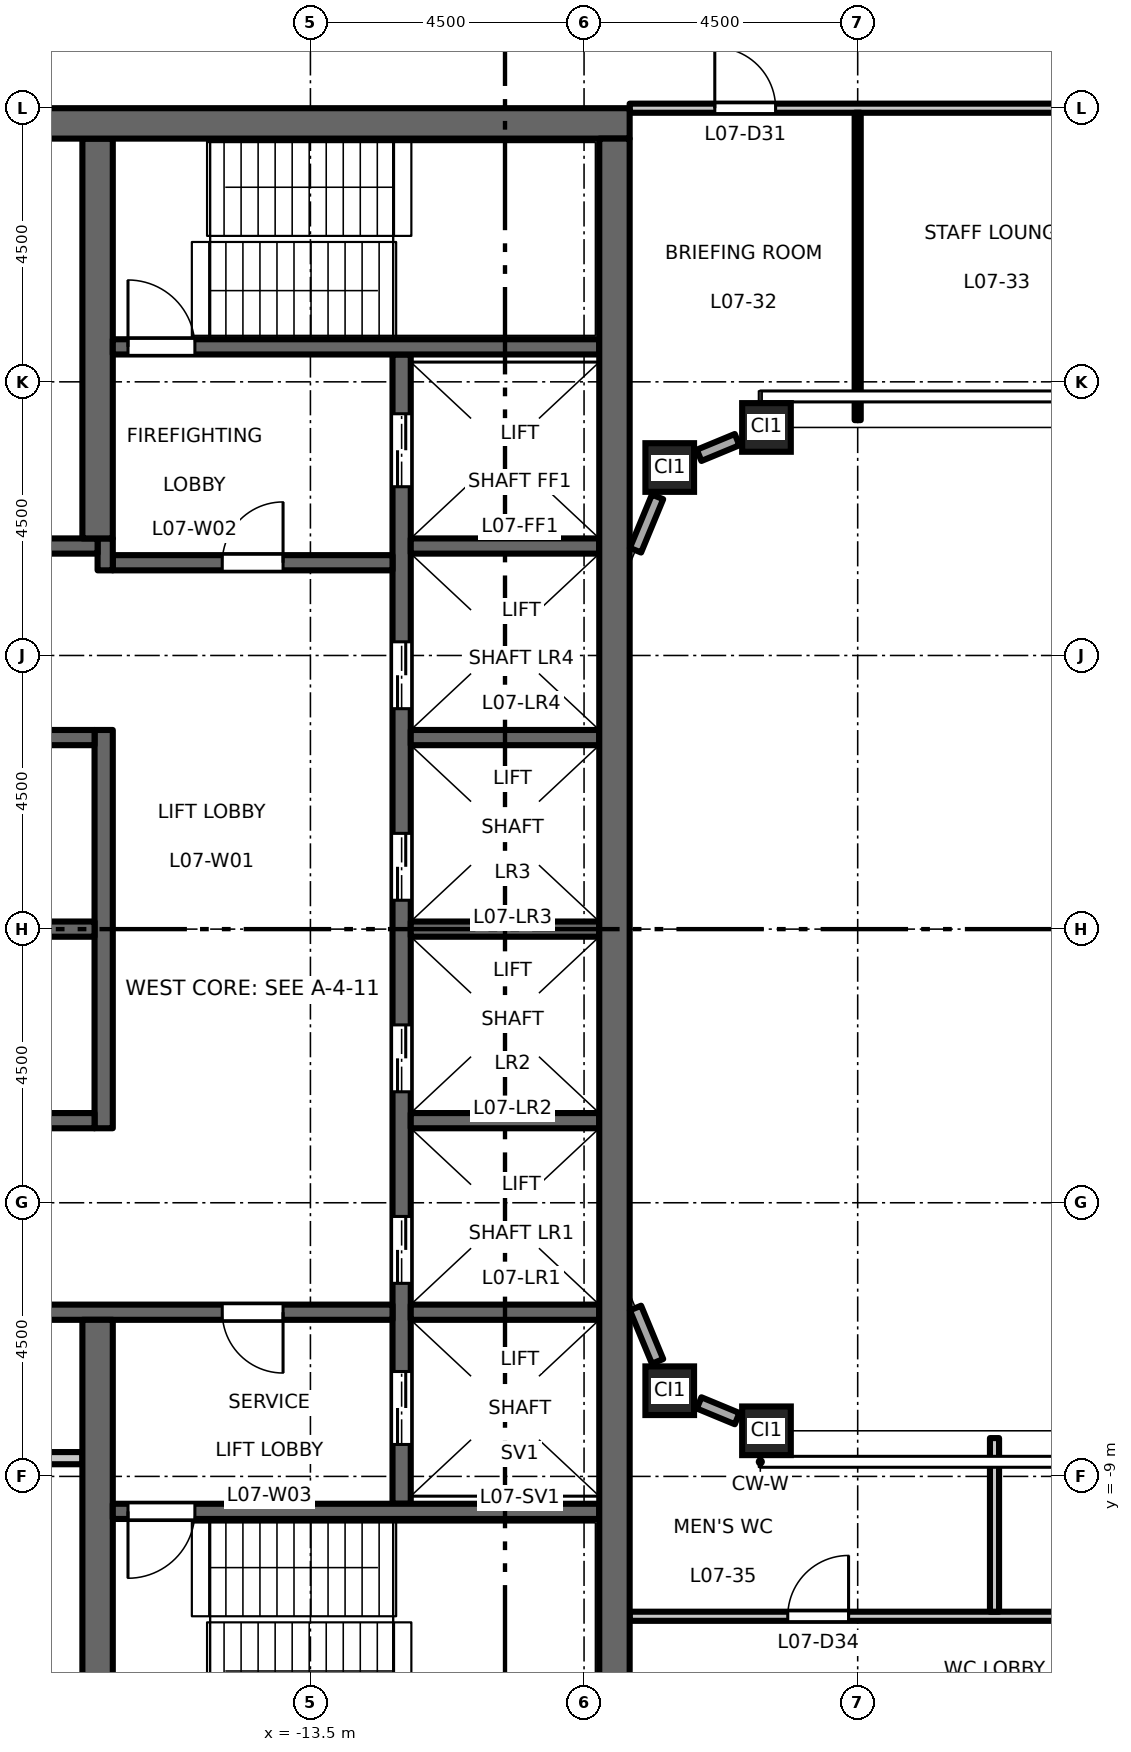
"""IFC4 building model, lengths in metres.
Left out: names, types, materials, properties, quantities, classifications, styles, units other than length and angle.
Written with IfcOpenShell. Run it as: python <this file> out.ifc"""

import sys

from ifc_helpers import new_model, si_unit, direction, frame, frame_2d, origin, origin_2d, place, context, subcontext, project, spatial, rectangle, hollow_rectangle, extrude, element, fill, save


model = new_model("IFC4")
c1 = context("Model", 3, precision=1e-05, world=origin(), true_north=direction((0.0, 1.0)))
c2 = subcontext(c1, "Body", "Model", "MODEL_VIEW")
j1 = project(units=[si_unit("LENGTHUNIT", "METRE"), si_unit("PLANEANGLEUNIT", "RADIAN")], contexts=[c1])
p1 = place(None, origin())
s1 = spatial("IfcSite", under=j1, at=p1, CompositionType="ELEMENT")
p2 = place(p1, origin())
s2 = spatial("IfcBuilding", under=s1, at=p2, CompositionType="ELEMENT")
p3 = place(p2, frame((0.0, 0.0, 35.7)))
s3 = spatial("IfcBuildingStorey", under=s2, at=p3, CompositionType="ELEMENT", Elevation=35.7)
for number, where, z_axis, x_axis in (
    (1, (-7.591, -7.591, 0.0), (0.0, 0.0, 1.0), (1.0, 0.0, 0.0)),
    (2, (-6.0, -8.25, 0.0), (0.0, 0.0, 1.0), (1.0, 0.0, 0.0)),
    (3, (-7.591, 7.591, 0.0), (0.0, 0.0, 1.0), (1.0, 0.0, 0.0)),
    (4, (-6.0, 8.25, 0.0), (0.0, 0.0, 1.0), (1.0, 0.0, 0.0)),
):
    element("IfcColumn", number, at=place(p3, frame(where, z_axis=z_axis, x_axis=x_axis)), inside=s3, PredefinedType="COLUMN", context=c2, shape_type="SweptSolid", body=[
        extrude(hollow_rectangle(XDim=0.8, YDim=0.8, WallThickness=0.05, at=origin_2d()), origin(), (0.0, 0.0, 1.0), 4.5),
    ])
p4 = place(p3, frame((-12.0, -9.45, 0.0), z_axis=(0.0, 0.0, 1.0), x_axis=(0.0, 1.0, 0.0)))
e5 = element("IfcWall", 5, at=p4, inside=s3, PredefinedType="SHEAR", context=c2, shape_type="SweptSolid", body=[
    extrude(rectangle(XDim=18.9, YDim=0.3, at=frame_2d((9.45, 0.0))), origin(), (0.0, 0.0, 1.0), 4.35),
])
p5 = place(p4, frame((3.625, 0.0, 0.0)))
e6 = element("IfcOpeningElement", 6, at=p5, cuts=e5, PredefinedType="OPENING", context=c2, shape_type="SweptSolid", body=[
    extrude(rectangle(XDim=1.1, YDim=2.1, at=frame_2d((0.55, 1.05))), frame((0.0, 0.16, 0.0), z_axis=(0.0, -1.0, 0.0), x_axis=(1.0, 0.0, 0.0)), (0.0, 0.0, 1.0), 0.32),
])
p6 = place(p4, frame((6.775, 0.0, 0.0)))
e7 = element("IfcOpeningElement", 7, at=p6, cuts=e5, PredefinedType="OPENING", context=c2, shape_type="SweptSolid", body=[
    extrude(rectangle(XDim=1.1, YDim=2.1, at=frame_2d((0.55, 1.05))), frame((0.0, 0.16, 0.0), z_axis=(0.0, -1.0, 0.0), x_axis=(1.0, 0.0, 0.0)), (0.0, 0.0, 1.0), 0.32),
])
p7 = place(p4, frame((9.925, 0.0, 0.0)))
e8 = element("IfcOpeningElement", 8, at=p7, cuts=e5, PredefinedType="OPENING", context=c2, shape_type="SweptSolid", body=[
    extrude(rectangle(XDim=1.1, YDim=2.1, at=frame_2d((0.55, 1.05))), frame((0.0, 0.16, 0.0), z_axis=(0.0, -1.0, 0.0), x_axis=(1.0, 0.0, 0.0)), (0.0, 0.0, 1.0), 0.32),
])
p8 = place(p4, frame((13.075, 0.0, 0.0)))
e9 = element("IfcOpeningElement", 9, at=p8, cuts=e5, PredefinedType="OPENING", context=c2, shape_type="SweptSolid", body=[
    extrude(rectangle(XDim=1.1, YDim=2.1, at=frame_2d((0.55, 1.05))), frame((0.0, 0.16, 0.0), z_axis=(0.0, -1.0, 0.0), x_axis=(1.0, 0.0, 0.0)), (0.0, 0.0, 1.0), 0.32),
])
p9 = place(p4, frame((16.725, 0.0, 0.0)))
e10 = element("IfcOpeningElement", 10, at=p9, cuts=e5, PredefinedType="OPENING", context=c2, shape_type="SweptSolid", body=[
    extrude(rectangle(XDim=1.2, YDim=2.1, at=frame_2d((0.6, 1.05))), frame((0.0, 0.16, 0.0), z_axis=(0.0, -1.0, 0.0), x_axis=(1.0, 0.0, 0.0)), (0.0, 0.0, 1.0), 0.32),
])
p10 = place(p4, frame((0.975, 0.0, 0.0)))
e11 = element("IfcOpeningElement", 11, at=p10, cuts=e5, PredefinedType="OPENING", context=c2, shape_type="SweptSolid", body=[
    extrude(rectangle(XDim=1.2, YDim=2.1, at=frame_2d((0.6, 1.05))), frame((0.0, 0.16, 0.0), z_axis=(0.0, -1.0, 0.0), x_axis=(1.0, 0.0, 0.0)), (0.0, 0.0, 1.0), 0.32),
])
p11 = place(p3, frame((-12.15, 6.025, 0.0), z_axis=(0.0, 0.0, 1.0), x_axis=(-1.0, 0.0, 0.0)))
e12 = element("IfcWall", 12, at=p11, inside=s3, PredefinedType="SHEAR", context=c2, shape_type="SweptSolid", body=[
    extrude(rectangle(XDim=4.6, YDim=0.25, at=frame_2d((2.3, 0.0))), origin(), (0.0, 0.0, 1.0), 4.35),
])
p12 = place(p11, frame((1.8, 0.0, 0.0)))
e13 = element("IfcOpeningElement", 13, at=p12, cuts=e12, PredefinedType="OPENING", context=c2, shape_type="SweptSolid", body=[
    extrude(rectangle(XDim=1.0, YDim=2.1, at=frame_2d((0.5, 1.05))), frame((0.0, 0.135, 0.0), z_axis=(0.0, -1.0, 0.0), x_axis=(1.0, 0.0, 0.0)), (0.0, 0.0, 1.0), 0.27),
])
p13 = place(p3, frame((-16.875, 5.9, 0.0), z_axis=(0.0, 0.0, 1.0), x_axis=(0.0, 1.0, 0.0)))
e14 = element("IfcWall", 14, at=p13, inside=s3, PredefinedType="SHEAR", context=c2, shape_type="SweptSolid", body=[
    extrude(rectangle(XDim=0.525, YDim=0.25, at=frame_2d((0.263, 0.0))), origin(), (0.0, 0.0, 1.0), 4.35),
])
p14 = place(p3, frame((-17.0, 6.3, 0.0), z_axis=(0.0, 0.0, 1.0), x_axis=(-1.0, 0.0, 0.0)))
e15 = element("IfcWall", 15, at=p14, inside=s3, PredefinedType="SHEAR", context=c2, shape_type="SweptSolid", body=[
    extrude(rectangle(XDim=4.25, YDim=0.25, at=frame_2d((2.125, 0.0))), origin(), (0.0, 0.0, 1.0), 4.35),
])
p15 = place(p3, frame((-12.15, -6.3, 0.0), z_axis=(0.0, 0.0, 1.0), x_axis=(-1.0, 0.0, 0.0)))
e16 = element("IfcWall", 16, at=p15, inside=s3, PredefinedType="SHEAR", context=c2, shape_type="SweptSolid", body=[
    extrude(rectangle(XDim=9.1, YDim=0.25, at=frame_2d((4.55, 0.0))), origin(), (0.0, 0.0, 1.0), 4.35),
])
p16 = place(p15, frame((1.8, 0.0, 0.0)))
e17 = element("IfcOpeningElement", 17, at=p16, cuts=e16, PredefinedType="OPENING", context=c2, shape_type="SweptSolid", body=[
    extrude(rectangle(XDim=1.0, YDim=2.1, at=frame_2d((0.5, 1.05))), frame((0.0, 0.135, 0.0), z_axis=(0.0, -1.0, 0.0), x_axis=(1.0, 0.0, 0.0)), (0.0, 0.0, 1.0), 0.27),
])
p17 = place(p15, frame((6.15, 0.0, 0.0)))
e18 = element("IfcOpeningElement", 18, at=p17, cuts=e16, PredefinedType="OPENING", context=c2, shape_type="SweptSolid", body=[
    extrude(rectangle(XDim=0.9, YDim=2.1, at=frame_2d((0.45, 1.05))), frame((0.0, 0.135, 0.0), z_axis=(0.0, -1.0, 0.0), x_axis=(1.0, 0.0, 0.0)), (0.0, 0.0, 1.0), 0.27),
])
p18 = place(p3, frame((-17.25, -8.7, 0.0), z_axis=(0.0, 0.0, 1.0), x_axis=(-1.0, 0.0, 0.0)))
e19 = element("IfcWall", 19, at=p18, inside=s3, PredefinedType="PARTITIONING", context=c2, shape_type="SweptSolid", body=[
    extrude(rectangle(XDim=4.0, YDim=0.2, at=frame_2d((2.0, 0.0))), origin(), (0.0, 0.0, 1.0), 4.35),
])
p19 = place(p3, frame((-16.9, -3.275, 0.0), z_axis=(0.0, 0.0, 1.0), x_axis=(0.0, 1.0, 0.0)))
e20 = element("IfcWall", 20, at=p19, inside=s3, PredefinedType="SHEAR", context=c2, shape_type="SweptSolid", body=[
    extrude(rectangle(XDim=6.55, YDim=0.3, at=frame_2d((3.275, 0.0))), origin(), (0.0, 0.0, 1.0), 4.35),
])
for number, where, z_axis, x_axis in (
    (21, (-17.05, 0.0, 0.0), (0.0, 0.0, 1.0), (-1.0, 0.0, 0.0)),
    (22, (-17.05, 3.15, 0.0), (0.0, 0.0, 1.0), (-1.0, 0.0, 0.0)),
    (23, (-17.05, -3.15, 0.0), (0.0, 0.0, 1.0), (-1.0, 0.0, 0.0)),
):
    element("IfcWall", number, at=place(p3, frame(where, z_axis=z_axis, x_axis=x_axis)), inside=s3, PredefinedType="SHEAR", context=c2, shape_type="SweptSolid", body=[
        extrude(rectangle(XDim=4.2, YDim=0.25, at=frame_2d((2.1, 0.0))), origin(), (0.0, 0.0, 1.0), 4.35),
    ])
for number, where, z_axis, x_axis in (
    (24, (-17.0, 6.425, 0.0), (0.0, 0.0, 1.0), (0.0, 1.0, 0.0)),
    (25, (-17.0, -13.0, 0.0), (0.0, 0.0, 1.0), (0.0, 1.0, 0.0)),
):
    element("IfcWall", number, at=place(p3, frame(where, z_axis=z_axis, x_axis=x_axis)), inside=s3, PredefinedType="SHEAR", context=c2, shape_type="SweptSolid", body=[
        extrude(rectangle(XDim=6.575, YDim=0.5, at=frame_2d((3.288, 0.0))), origin(), (0.0, 0.0, 1.0), 4.35),
    ])
for number, where, z_axis, x_axis in (
    (26, (-8.75, 0.0, 0.0), (0.0, 0.0, 1.0), (-1.0, 0.0, 0.0)),
    (27, (-8.75, 3.15, 0.0), (0.0, 0.0, 1.0), (-1.0, 0.0, 0.0)),
    (28, (-8.75, 6.3, 0.0), (0.0, 0.0, 1.0), (-1.0, 0.0, 0.0)),
    (29, (-8.75, -3.15, 0.0), (0.0, 0.0, 1.0), (-1.0, 0.0, 0.0)),
    (30, (-8.75, -6.3, 0.0), (0.0, 0.0, 1.0), (-1.0, 0.0, 0.0)),
):
    element("IfcWall", number, at=place(p3, frame(where, z_axis=z_axis, x_axis=x_axis)), inside=s3, PredefinedType="SHEAR", context=c2, shape_type="SweptSolid", body=[
        extrude(rectangle(XDim=3.1, YDim=0.25, at=frame_2d((1.55, 0.0))), origin(), (0.0, 0.0, 1.0), 4.35),
    ])
p20 = place(p3, frame((-8.75, 9.575, 0.0), z_axis=(0.0, 0.0, 1.0), x_axis=(-1.0, 0.0, 0.0)))
e31 = element("IfcWall", 31, at=p20, inside=s3, PredefinedType="SHEAR", context=c2, shape_type="SweptSolid", body=[
    extrude(rectangle(XDim=8.0, YDim=0.25, at=frame_2d((4.0, 0.0))), origin(), (0.0, 0.0, 1.0), 4.35),
])
p21 = place(p20, frame((6.65, 0.0, 0.0)))
e32 = element("IfcOpeningElement", 32, at=p21, cuts=e31, PredefinedType="OPENING", context=c2, shape_type="SweptSolid", body=[
    extrude(rectangle(XDim=1.1, YDim=2.1, at=frame_2d((0.55, 1.05))), frame((0.0, 0.135, 0.0), z_axis=(0.0, -1.0, 0.0), x_axis=(1.0, 0.0, 0.0)), (0.0, 0.0, 1.0), 0.27),
])
p22 = place(p3, frame((-8.75, -9.575, 0.0), z_axis=(0.0, 0.0, 1.0), x_axis=(-1.0, 0.0, 0.0)))
e33 = element("IfcWall", 33, at=p22, inside=s3, PredefinedType="SHEAR", context=c2, shape_type="SweptSolid", body=[
    extrude(rectangle(XDim=8.0, YDim=0.25, at=frame_2d((4.0, 0.0))), origin(), (0.0, 0.0, 1.0), 4.35),
])
p23 = place(p22, frame((6.65, 0.0, 0.0)))
e34 = element("IfcOpeningElement", 34, at=p23, cuts=e33, PredefinedType="OPENING", context=c2, shape_type="SweptSolid", body=[
    extrude(rectangle(XDim=1.1, YDim=2.1, at=frame_2d((0.55, 1.05))), frame((0.0, 0.135, 0.0), z_axis=(0.0, -1.0, 0.0), x_axis=(1.0, 0.0, 0.0)), (0.0, 0.0, 1.0), 0.27),
])
p24 = place(p3, frame((-8.25, 13.25, 0.0), z_axis=(0.0, 0.0, 1.0), x_axis=(-1.0, 0.0, 0.0)))
e35 = element("IfcWall", 35, at=p24, inside=s3, PredefinedType="SHEAR", context=c2, shape_type="SweptSolid", body=[
    extrude(rectangle(XDim=13.5, YDim=0.5, at=frame_2d((6.75, 0.0))), origin(), (0.0, 0.0, 1.0), 4.35),
])
p25 = place(p3, frame((-8.5, -13.0, 0.0), z_axis=(0.0, 0.0, 1.0), x_axis=(0.0, 1.0, 0.0)))
e36 = element("IfcWall", 36, at=p25, inside=s3, PredefinedType="SHEAR", context=c2, shape_type="SweptSolid", body=[
    extrude(rectangle(XDim=26.0, YDim=0.5, at=frame_2d((13.0, 0.0))), origin(), (0.0, 0.0, 1.0), 4.35),
])
p26 = place(p3, frame((-6.483, 8.05, 0.0), z_axis=(0.0, 0.0, 1.0), x_axis=(-0.923854141361, -0.382744726273, 0.0)))
e37 = element("IfcWall", 37, at=p26, inside=s3, PredefinedType="STANDARD", context=c2, shape_type="SweptSolid", body=[
    extrude(rectangle(XDim=0.677, YDim=0.2, at=frame_2d((0.338, 0.0))), origin(), (0.0, 0.0, 1.0), 3.73),
])
for number, where, z_axis, x_axis in (
    (38, (-7.791, 7.108, 0.0), (0.0, 0.0, 1.0), (-0.383, -0.924, 0.0)),
    (39, (-8.154, -6.231, 0.0), (0.0, 0.0, 1.0), (0.383, -0.924, 0.0)),
):
    element("IfcWall", number, at=place(p3, frame(where, z_axis=z_axis, x_axis=x_axis)), inside=s3, PredefinedType="STANDARD", context=c2, shape_type="SweptSolid", body=[
        extrude(rectangle(XDim=0.949, YDim=0.2, at=frame_2d((0.475, 0.0))), origin(), (0.0, 0.0, 1.0), 3.73),
    ])
p27 = place(p3, frame((-7.108, -7.791, 0.0), z_axis=(0.0, 0.0, 1.0), x_axis=(0.923854141361, -0.382744726273, 0.0)))
e40 = element("IfcWall", 40, at=p27, inside=s3, PredefinedType="STANDARD", context=c2, shape_type="SweptSolid", body=[
    extrude(rectangle(XDim=0.677, YDim=0.2, at=frame_2d((0.338, 0.0))), origin(), (0.0, 0.0, 1.0), 3.73),
])
p28 = place(p3, frame((-8.25, -11.3, 0.0), z_axis=(0.0, 0.0, 1.0), x_axis=(1.0, 0.0, 0.0)))
e41 = element("IfcWall", 41, at=p28, inside=s3, PredefinedType="PARTITIONING", context=c2, shape_type="SweptSolid", body=[
    extrude(rectangle(XDim=14.79, YDim=0.15, at=frame_2d((7.395, 0.0))), origin(), (0.0, 0.0, 1.0), 4.35),
])
p29 = place(p28, frame((2.6, 0.0, 0.0)))
e42 = element("IfcOpeningElement", 42, at=p29, cuts=e41, PredefinedType="OPENING", context=c2, shape_type="SweptSolid", body=[
    extrude(rectangle(XDim=1.0, YDim=2.1, at=frame_2d((0.5, 1.05))), frame((0.0, 0.085, 0.0), z_axis=(0.0, -1.0, 0.0), x_axis=(1.0, 0.0, 0.0)), (0.0, 0.0, 1.0), 0.17),
])
p30 = place(p28, frame((8.85, 0.0, 0.0)))
e43 = element("IfcOpeningElement", 43, at=p30, cuts=e41, PredefinedType="OPENING", context=c2, shape_type="SweptSolid", body=[
    extrude(rectangle(XDim=1.0, YDim=2.1, at=frame_2d((0.5, 1.05))), frame((0.0, 0.085, 0.0), z_axis=(0.0, -1.0, 0.0), x_axis=(1.0, 0.0, 0.0)), (0.0, 0.0, 1.0), 0.17),
])
p31 = place(p28, frame((12.89, 0.0, 0.0)))
e44 = element("IfcOpeningElement", 44, at=p31, cuts=e41, PredefinedType="OPENING", context=c2, shape_type="SweptSolid", body=[
    extrude(rectangle(XDim=1.0, YDim=2.1, at=frame_2d((0.5, 1.05))), frame((0.0, 0.085, 0.0), z_axis=(0.0, -1.0, 0.0), x_axis=(1.0, 0.0, 0.0)), (0.0, 0.0, 1.0), 0.17),
])
p32 = place(p3, frame((-8.25, 13.5, 0.0), z_axis=(0.0, 0.0, 1.0), x_axis=(1.0, 0.0, 0.0)))
e45 = element("IfcWall", 45, at=p32, inside=s3, PredefinedType="PARTITIONING", context=c2, shape_type="SweptSolid", body=[
    extrude(rectangle(XDim=16.5, YDim=0.15, at=frame_2d((8.25, 0.0))), origin(), (0.0, 0.0, 1.0), 3.85),
])
p33 = place(p32, frame((1.4, 0.0, 0.0)))
e46 = element("IfcOpeningElement", 46, at=p33, cuts=e45, PredefinedType="OPENING", context=c2, shape_type="SweptSolid", body=[
    extrude(rectangle(XDim=1.0, YDim=2.1, at=frame_2d((0.5, 1.05))), frame((0.0, 0.085, 0.0), z_axis=(0.0, -1.0, 0.0), x_axis=(1.0, 0.0, 0.0)), (0.0, 0.0, 1.0), 0.17),
])
p34 = place(p32, frame((9.65, 0.0, 0.0)))
e47 = element("IfcOpeningElement", 47, at=p34, cuts=e45, PredefinedType="OPENING", context=c2, shape_type="SweptSolid", body=[
    extrude(rectangle(XDim=1.0, YDim=2.1, at=frame_2d((0.5, 1.05))), frame((0.0, 0.085, 0.0), z_axis=(0.0, -1.0, 0.0), x_axis=(1.0, 0.0, 0.0)), (0.0, 0.0, 1.0), 0.17),
])
p35 = place(p3, frame((-4.5, 8.37, 0.0), z_axis=(0.0, 0.0, 1.0), x_axis=(0.0, 1.0, 0.0)))
e48 = element("IfcWall", 48, at=p35, inside=s3, PredefinedType="PARTITIONING", context=c2, shape_type="SweptSolid", body=[
    extrude(rectangle(XDim=5.055, YDim=0.1, at=frame_2d((2.527, 0.0))), origin(), (0.0, 0.0, 1.0), 3.35),
])
p36 = place(p3, frame((-2.25, -11.225, 0.0), z_axis=(0.0, 0.0, 1.0), x_axis=(0.0, 1.0, 0.0)))
e49 = element("IfcWall", 49, at=p36, inside=s3, PredefinedType="PARTITIONING", context=c2, shape_type="SweptSolid", body=[
    extrude(rectangle(XDim=2.855, YDim=0.15, at=frame_2d((1.427, 0.0))), origin(), (0.0, 0.0, 1.0), 4.35),
])
p37 = place(p12, origin())
e50 = element("IfcDoor", 50, at=p37, inside=s3, OperationType="SINGLE_SWING_LEFT", PredefinedType="DOOR", context=c2, shape_type="SweptSolid", body=[
    extrude(rectangle(XDim=1.0, YDim=2.1, at=frame_2d((0.5, 1.05))), frame((0.0, 0.025, 0.0), z_axis=(0.0, -1.0, 0.0), x_axis=(1.0, 0.0, 0.0)), (0.0, 0.0, 1.0), 0.05),
])
fill(e13, e50)
p38 = place(p16, origin())
e51 = element("IfcDoor", 51, at=p38, inside=s3, OperationType="SINGLE_SWING_RIGHT", PredefinedType="DOOR", context=c2, shape_type="SweptSolid", body=[
    extrude(rectangle(XDim=1.0, YDim=2.1, at=frame_2d((0.5, 1.05))), frame((0.0, 0.025, 0.0), z_axis=(0.0, -1.0, 0.0), x_axis=(1.0, 0.0, 0.0)), (0.0, 0.0, 1.0), 0.05),
])
fill(e17, e51)
p39 = place(p21, origin())
e52 = element("IfcDoor", 52, at=p39, inside=s3, OperationType="SINGLE_SWING_RIGHT", PredefinedType="DOOR", context=c2, shape_type="SweptSolid", body=[
    extrude(rectangle(XDim=1.1, YDim=2.1, at=frame_2d((0.55, 1.05))), frame((0.0, 0.025, 0.0), z_axis=(0.0, -1.0, 0.0), x_axis=(1.0, 0.0, 0.0)), (0.0, 0.0, 1.0), 0.05),
])
fill(e32, e52)
p40 = place(p23, origin())
e53 = element("IfcDoor", 53, at=p40, inside=s3, OperationType="SINGLE_SWING_LEFT", PredefinedType="DOOR", context=c2, shape_type="SweptSolid", body=[
    extrude(rectangle(XDim=1.1, YDim=2.1, at=frame_2d((0.55, 1.05))), frame((0.0, 0.025, 0.0), z_axis=(0.0, -1.0, 0.0), x_axis=(1.0, 0.0, 0.0)), (0.0, 0.0, 1.0), 0.05),
])
fill(e34, e53)
p41 = place(p5, origin())
e54 = element("IfcDoor", 54, at=p41, inside=s3, OperationType="DOUBLE_DOOR_SLIDING", PredefinedType="DOOR", context=c2, shape_type="SweptSolid", body=[
    extrude(rectangle(XDim=1.1, YDim=2.1, at=frame_2d((0.55, 1.05))), frame((0.0, 0.025, 0.0), z_axis=(0.0, -1.0, 0.0), x_axis=(1.0, 0.0, 0.0)), (0.0, 0.0, 1.0), 0.05),
])
fill(e6, e54)
p42 = place(p6, origin())
e55 = element("IfcDoor", 55, at=p42, inside=s3, OperationType="DOUBLE_DOOR_SLIDING", PredefinedType="DOOR", context=c2, shape_type="SweptSolid", body=[
    extrude(rectangle(XDim=1.1, YDim=2.1, at=frame_2d((0.55, 1.05))), frame((0.0, 0.025, 0.0), z_axis=(0.0, -1.0, 0.0), x_axis=(1.0, 0.0, 0.0)), (0.0, 0.0, 1.0), 0.05),
])
fill(e7, e55)
p43 = place(p7, origin())
e56 = element("IfcDoor", 56, at=p43, inside=s3, OperationType="DOUBLE_DOOR_SLIDING", PredefinedType="DOOR", context=c2, shape_type="SweptSolid", body=[
    extrude(rectangle(XDim=1.1, YDim=2.1, at=frame_2d((0.55, 1.05))), frame((0.0, 0.025, 0.0), z_axis=(0.0, -1.0, 0.0), x_axis=(1.0, 0.0, 0.0)), (0.0, 0.0, 1.0), 0.05),
])
fill(e8, e56)
p44 = place(p8, origin())
e57 = element("IfcDoor", 57, at=p44, inside=s3, OperationType="DOUBLE_DOOR_SLIDING", PredefinedType="DOOR", context=c2, shape_type="SweptSolid", body=[
    extrude(rectangle(XDim=1.1, YDim=2.1, at=frame_2d((0.55, 1.05))), frame((0.0, 0.025, 0.0), z_axis=(0.0, -1.0, 0.0), x_axis=(1.0, 0.0, 0.0)), (0.0, 0.0, 1.0), 0.05),
])
fill(e9, e57)
p45 = place(p9, origin())
e58 = element("IfcDoor", 58, at=p45, inside=s3, OperationType="DOUBLE_DOOR_SLIDING", PredefinedType="DOOR", context=c2, shape_type="SweptSolid", body=[
    extrude(rectangle(XDim=1.2, YDim=2.1, at=frame_2d((0.6, 1.05))), frame((0.0, 0.025, 0.0), z_axis=(0.0, -1.0, 0.0), x_axis=(1.0, 0.0, 0.0)), (0.0, 0.0, 1.0), 0.05),
])
fill(e10, e58)
p46 = place(p10, origin())
e59 = element("IfcDoor", 59, at=p46, inside=s3, OperationType="DOUBLE_DOOR_SLIDING", PredefinedType="DOOR", context=c2, shape_type="SweptSolid", body=[
    extrude(rectangle(XDim=1.2, YDim=2.1, at=frame_2d((0.6, 1.05))), frame((0.0, 0.025, 0.0), z_axis=(0.0, -1.0, 0.0), x_axis=(1.0, 0.0, 0.0)), (0.0, 0.0, 1.0), 0.05),
])
fill(e11, e59)
p47 = place(p33, origin())
e60 = element("IfcDoor", 60, at=p47, inside=s3, OperationType="SINGLE_SWING_LEFT", PredefinedType="DOOR", context=c2, shape_type="SweptSolid", body=[
    extrude(rectangle(XDim=1.0, YDim=2.1, at=frame_2d((0.5, 1.05))), frame((0.0, 0.025, 0.0), z_axis=(0.0, -1.0, 0.0), x_axis=(1.0, 0.0, 0.0)), (0.0, 0.0, 1.0), 0.05),
])
fill(e46, e60)
p48 = place(p29, origin())
e61 = element("IfcDoor", 61, at=p48, inside=s3, OperationType="SINGLE_SWING_RIGHT", PredefinedType="DOOR", context=c2, shape_type="SweptSolid", body=[
    extrude(rectangle(XDim=1.0, YDim=2.1, at=frame_2d((0.5, 1.05))), frame((0.0, 0.025, 0.0), z_axis=(0.0, -1.0, 0.0), x_axis=(1.0, 0.0, 0.0)), (0.0, 0.0, 1.0), 0.05),
])
fill(e42, e61)
save(model, sys.argv[1])
